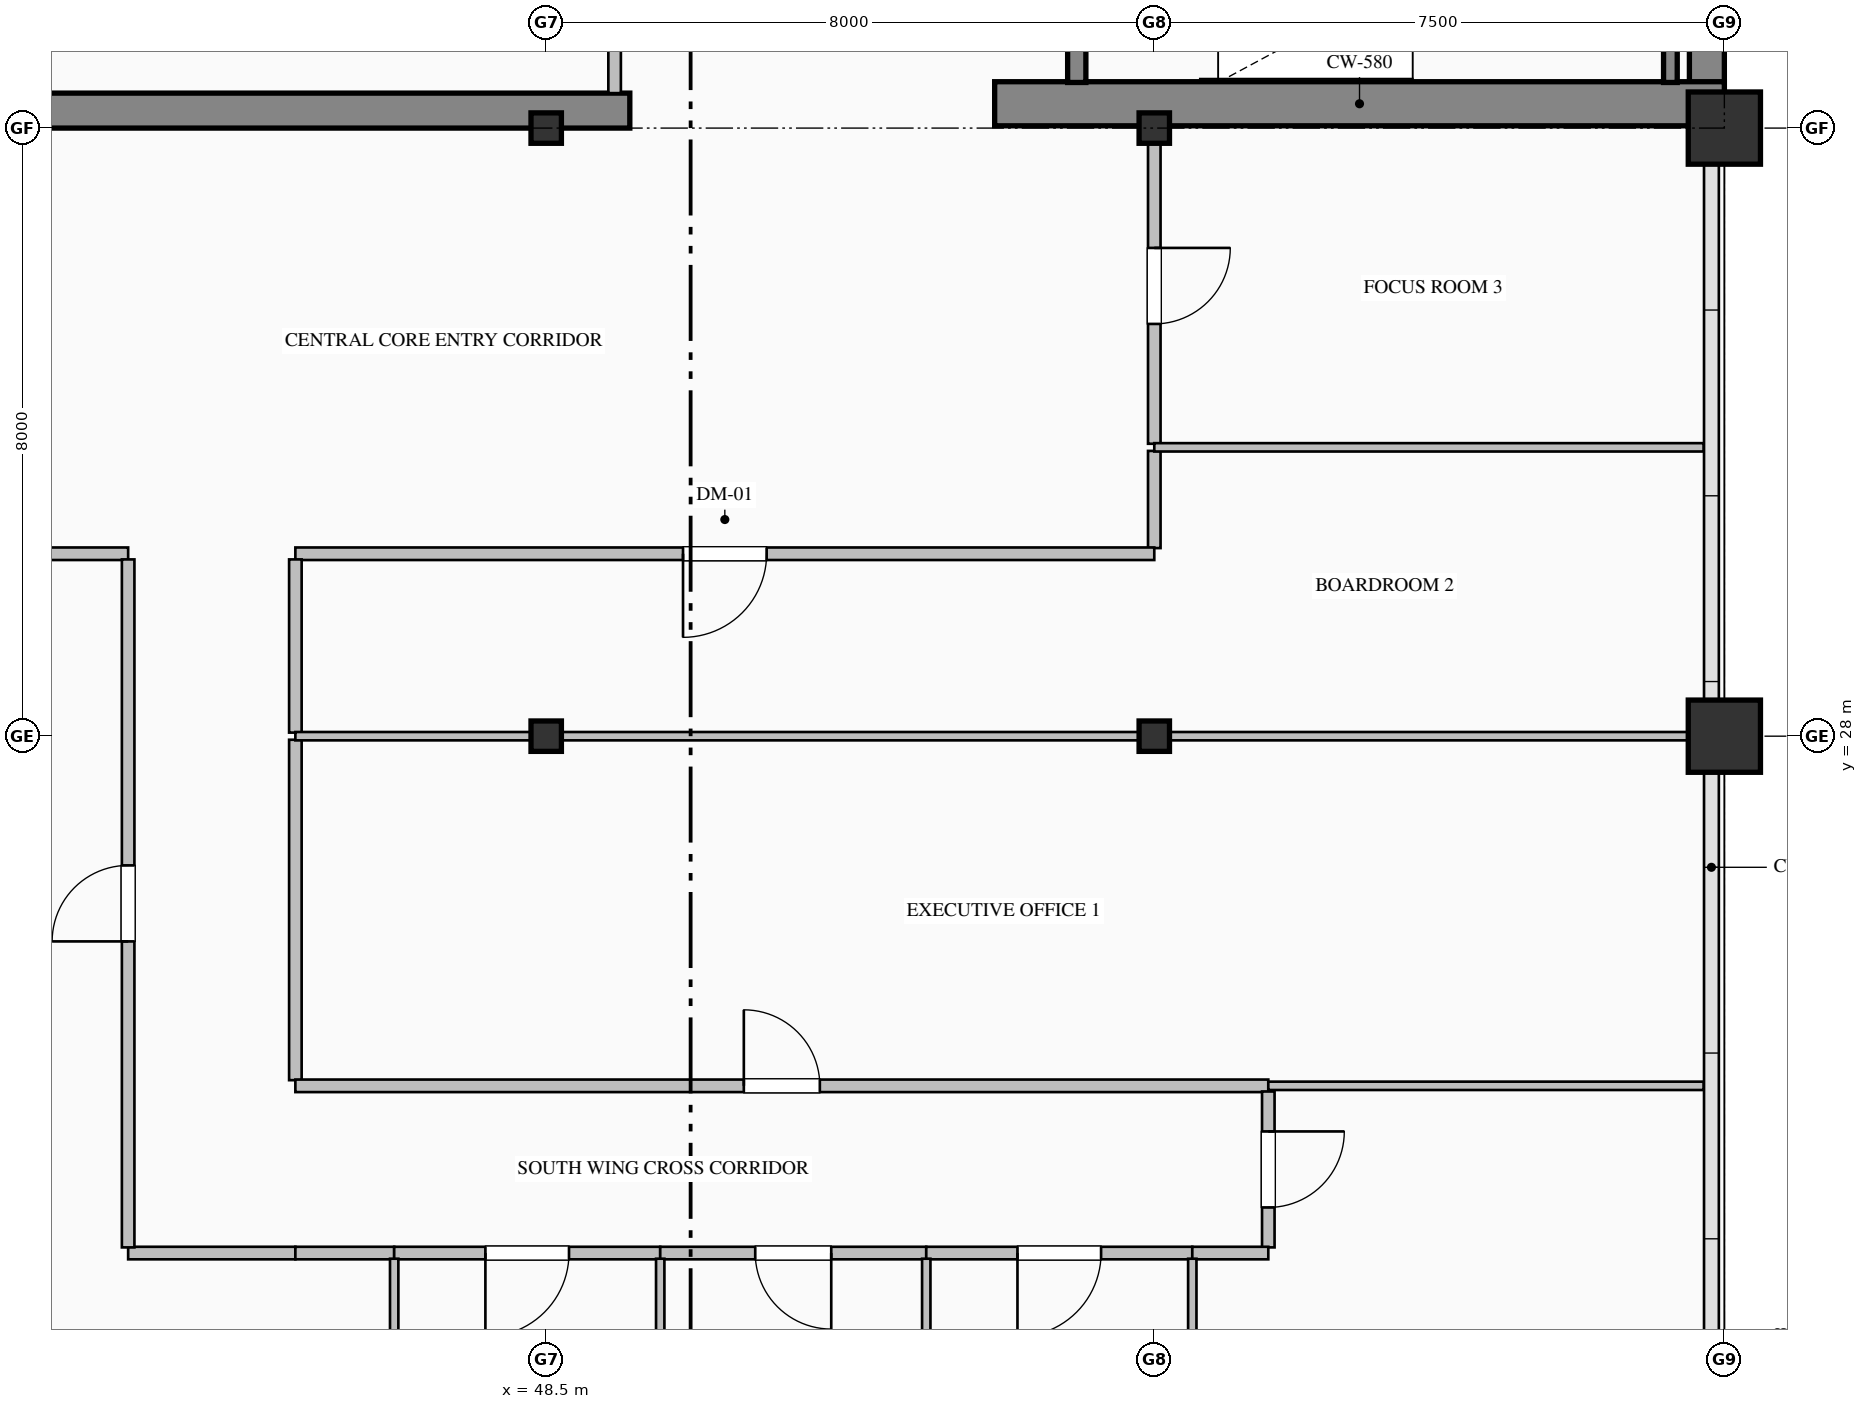
"""IFC4 building model, lengths in metres.
Left out: names, types, materials, properties, quantities, classifications, styles, units other than length and angle.
Written with IfcOpenShell. Run it as: python <this file> out.ifc"""

import sys

from ifc_helpers import new_model, si_unit, direction, frame, frame_2d, origin, origin_2d, place, context, subcontext, project, spatial, rectangle, hollow_rectangle, i_section, extrude, element, fill, save


model = new_model("IFC4")
c1 = context("Model", 3, precision=1e-05, world=origin(), true_north=direction((0.0, 1.0)))
c2 = subcontext(c1, "Body", "Model", "MODEL_VIEW")
j1 = project(units=[si_unit("LENGTHUNIT", "METRE"), si_unit("PLANEANGLEUNIT", "RADIAN")], contexts=[c1])
p1 = place(None, origin())
s1 = spatial("IfcSite", under=j1, at=p1, CompositionType="ELEMENT")
p2 = place(p1, origin())
s2 = spatial("IfcBuilding", under=s1, at=p2, CompositionType="ELEMENT")
p3 = place(p2, frame((0.0, 0.0, 205.8)))
s3 = spatial("IfcBuildingStorey", under=s2, at=p3, CompositionType="ELEMENT", Elevation=205.8)
p4 = place(p3, frame((63.77, 36.32, 0.0), z_axis=(0.0, 0.0, 1.0), x_axis=(0.0, 1.0, 0.0)))
e1 = element("IfcWall", 1, at=p4, inside=s3, PredefinedType="SHEAR", context=c2, shape_type="SweptSolid", body=[
    extrude(rectangle(XDim=15.22, YDim=0.46, at=frame_2d((7.61, 0.0))), origin(), (0.0, 0.0, 1.0), 3.775),
])
p5 = place(p3, frame((40.5, 36.23, 0.0), z_axis=(0.0, 0.0, 1.0), x_axis=(1.0, 0.0, 0.0)))
e2 = element("IfcWall", 2, at=p5, inside=s3, PredefinedType="SHEAR", context=c2, shape_type="SweptSolid", body=[
    extrude(rectangle(XDim=9.1, YDim=0.46, at=frame_2d((4.55, 0.0))), origin(), (0.0, 0.0, 1.0), 3.775),
])
p6 = place(p3, frame((54.4, 36.32, 0.0), z_axis=(0.0, 0.0, 1.0), x_axis=(1.0, 0.0, 0.0)))
e3 = element("IfcWall", 3, at=p6, inside=s3, PredefinedType="SHEAR", context=c2, shape_type="SweptSolid", body=[
    extrude(rectangle(XDim=9.6, YDim=0.58, at=frame_2d((4.8, 0.0))), origin(), (0.0, 0.0, 1.0), 4.0),
])
for number, where, z_axis, x_axis in (
    (4, (48.5, 28.0, 0.0), (0.0, 0.0, 1.0), (1.0, 0.0, 0.0)),
    (5, (48.5, 36.0, 0.0), (0.0, 0.0, 1.0), (1.0, 0.0, 0.0)),
    (6, (56.5, 28.0, 0.0), (0.0, 0.0, 1.0), (1.0, 0.0, 0.0)),
    (7, (56.5, 36.0, 0.0), (0.0, 0.0, 1.0), (1.0, 0.0, 0.0)),
):
    element("IfcColumn", number, at=place(p3, frame(where, z_axis=z_axis, x_axis=x_axis)), inside=s3, PredefinedType="COLUMN", context=c2, shape_type="SweptSolid", body=[
        extrude(i_section(OverallWidth=0.4, OverallDepth=0.4, WebThickness=0.013, FlangeThickness=0.021, FilletRadius=0.022, at=origin_2d()), origin(), (0.0, 0.0, 1.0), 4.0),
    ])
for number, where, z_axis, x_axis in (
    (8, (64.0, 28.0, 0.0), (0.0, 0.0, 1.0), (1.0, 0.0, 0.0)),
    (9, (64.0, 36.0, 0.0), (0.0, 0.0, 1.0), (1.0, 0.0, 0.0)),
):
    element("IfcColumn", number, at=place(p3, frame(where, z_axis=z_axis, x_axis=x_axis)), inside=s3, PredefinedType="COLUMN", context=c2, shape_type="SweptSolid", body=[
        extrude(hollow_rectangle(XDim=0.95, YDim=0.95, WallThickness=0.036, at=origin_2d()), origin(), (0.0, 0.0, 1.0), 4.0),
    ])
p7 = place(p3, frame((55.48, 39.75, 0.0), z_axis=(0.0, 0.0, 1.0), x_axis=(0.0, -1.0, 0.0)))
e10 = element("IfcWall", 10, at=p7, inside=s3, PredefinedType="SOLIDWALL", context=c2, shape_type="SweptSolid", body=[
    extrude(rectangle(XDim=3.15, YDim=0.24, at=frame_2d((1.575, 0.0))), origin(), (0.0, 0.0, 1.0), 4.0),
])
p8 = place(p7, frame((1.0, 0.0, 0.0)))
e11 = element("IfcOpeningElement", 11, at=p8, cuts=e10, PredefinedType="OPENING", context=c2, shape_type="SweptSolid", body=[
    extrude(rectangle(XDim=1.15, YDim=2.2, at=frame_2d((0.575, 1.1))), frame((0.0, 0.13, 0.0), z_axis=(0.0, -1.0, 0.0), x_axis=(1.0, 0.0, 0.0)), (0.0, 0.0, 1.0), 0.26),
])
p9 = place(p3, frame((63.29, 36.6, 0.0), z_axis=(0.0, 0.0, 1.0), x_axis=(0.0, 1.0, 0.0)))
e12 = element("IfcWall", 12, at=p9, inside=s3, PredefinedType="SOLIDWALL", context=c2, shape_type="SweptSolid", body=[
    extrude(rectangle(XDim=3.15, YDim=0.18, at=frame_2d((1.575, 0.0))), origin(), (0.0, 0.0, 1.0), 4.0),
])
p10 = place(p3, frame((49.4, 36.46, 0.0), z_axis=(0.0, 0.0, 1.0), x_axis=(0.0, 1.0, 0.0)))
e13 = element("IfcWall", 13, at=p10, inside=s3, PredefinedType="PARTITIONING", context=c2, shape_type="SweptSolid", body=[
    extrude(rectangle(XDim=7.69, YDim=0.165, at=frame_2d((3.845, 0.0))), origin(), (0.0, 0.0, 1.0), 3.017),
])
p11 = place(p10, frame((3.345, 0.0, 0.0)))
e14 = element("IfcOpeningElement", 14, at=p11, cuts=e13, PredefinedType="OPENING", context=c2, shape_type="SweptSolid", body=[
    extrude(rectangle(XDim=1.0, YDim=2.15, at=frame_2d((0.5, 1.075))), frame((0.0, 0.093, 0.0), z_axis=(0.0, -1.0, 0.0), x_axis=(1.0, 0.0, 0.0)), (0.0, 0.0, 1.0), 0.185),
])
p12 = place(p3, frame((56.5, 31.753, 0.0), z_axis=(0.0, 0.0, 1.0), x_axis=(0.0, -1.0, 0.0)))
e15 = element("IfcWall", 15, at=p12, inside=s3, PredefinedType="PARTITIONING", context=c2, shape_type="SweptSolid", body=[
    extrude(rectangle(XDim=1.278, YDim=0.165, at=frame_2d((0.639, 0.0))), origin(), (0.0, 0.0, 1.0), 3.179),
])
p13 = place(p3, frame((56.5, 30.4, 0.0), z_axis=(0.0, 0.0, 1.0), x_axis=(-1.0, 0.0, 0.0)))
e16 = element("IfcWall", 16, at=p13, inside=s3, PredefinedType="PARTITIONING", context=c2, shape_type="SweptSolid", body=[
    extrude(rectangle(XDim=11.3, YDim=0.165, at=frame_2d((5.65, 0.0))), origin(), (0.0, 0.0, 1.0), 3.775),
])
p14 = place(p13, frame((5.1, 0.0, 0.0)))
e17 = element("IfcOpeningElement", 17, at=p14, cuts=e16, PredefinedType="OPENING", context=c2, shape_type="SweptSolid", body=[
    extrude(rectangle(XDim=1.1, YDim=2.2, at=frame_2d((0.55, 1.1))), frame((0.0, 0.093, 0.0), z_axis=(0.0, -1.0, 0.0), x_axis=(1.0, 0.0, 0.0)), (0.0, 0.0, 1.0), 0.185),
])
p15 = place(p3, frame((56.5, 36.0, 0.0), z_axis=(0.0, 0.0, 1.0), x_axis=(0.0, -1.0, 0.0)))
e18 = element("IfcWall", 18, at=p15, inside=s3, PredefinedType="PARTITIONING", context=c2, shape_type="SweptSolid", body=[
    extrude(rectangle(XDim=4.153, YDim=0.165, at=frame_2d((2.077, 0.0))), origin(), (0.0, 0.0, 1.0), 3.179),
])
p16 = place(p15, frame((1.576, 0.0, 0.0)))
e19 = element("IfcOpeningElement", 19, at=p16, cuts=e18, PredefinedType="OPENING", context=c2, shape_type="SweptSolid", body=[
    extrude(rectangle(XDim=1.0, YDim=2.15, at=frame_2d((0.5, 1.075))), frame((0.0, 0.093, 0.0), z_axis=(0.0, -1.0, 0.0), x_axis=(1.0, 0.0, 0.0)), (0.0, 0.0, 1.0), 0.185),
])
p17 = place(p3, frame((43.0, 30.4, 0.0), z_axis=(0.0, 0.0, 1.0), x_axis=(-1.0, 0.0, 0.0)))
e20 = element("IfcWall", 20, at=p17, inside=s3, PredefinedType="PARTITIONING", context=c2, shape_type="SweptSolid", body=[
    extrude(rectangle(XDim=2.5, YDim=0.165, at=frame_2d((1.25, 0.0))), origin(), (0.0, 0.0, 1.0), 3.775),
])
p18 = place(p3, frame((45.2, 27.953, 0.0), z_axis=(0.0, 0.0, 1.0), x_axis=(0.0, -1.0, 0.0)))
e21 = element("IfcWall", 21, at=p18, inside=s3, PredefinedType="PARTITIONING", context=c2, shape_type="SweptSolid", body=[
    extrude(rectangle(XDim=4.478, YDim=0.165, at=frame_2d((2.239, 0.0))), origin(), (0.0, 0.0, 1.0), 3.775),
])
p19 = place(p3, frame((45.2, 30.325, 0.0), z_axis=(0.0, 0.0, 1.0), x_axis=(0.0, -1.0, 0.0)))
e22 = element("IfcWall", 22, at=p19, inside=s3, PredefinedType="PARTITIONING", context=c2, shape_type="SweptSolid", body=[
    extrude(rectangle(XDim=2.278, YDim=0.165, at=frame_2d((1.139, 0.0))), origin(), (0.0, 0.0, 1.0), 3.775),
])
p20 = place(p3, frame((45.2, 21.2, 0.0), z_axis=(0.0, 0.0, 1.0), x_axis=(-1.0, 0.0, 0.0)))
e23 = element("IfcWall", 23, at=p20, inside=s3, PredefinedType="PARTITIONING", context=c2, shape_type="SweptSolid", body=[
    extrude(rectangle(XDim=2.2, YDim=0.165, at=frame_2d((1.1, 0.0))), origin(), (0.0, 0.0, 1.0), 3.775),
])
p21 = place(p3, frame((43.0, 21.274, 0.0), z_axis=(0.0, 0.0, 1.0), x_axis=(0.0, 1.0, 0.0)))
e24 = element("IfcWall", 24, at=p21, inside=s3, PredefinedType="PARTITIONING", context=c2, shape_type="SweptSolid", body=[
    extrude(rectangle(XDim=9.051, YDim=0.165, at=frame_2d((4.525, 0.0))), origin(), (0.0, 0.0, 1.0), 3.775),
])
p22 = place(p21, frame((4.025, 0.0, 0.0)))
e25 = element("IfcOpeningElement", 25, at=p22, cuts=e24, PredefinedType="OPENING", context=c2, shape_type="SweptSolid", body=[
    extrude(rectangle(XDim=1.0, YDim=2.15, at=frame_2d((0.5, 1.075))), frame((0.0, 0.093, 0.0), z_axis=(0.0, -1.0, 0.0), x_axis=(1.0, 0.0, 0.0)), (0.0, 0.0, 1.0), 0.185),
])
p23 = place(p3, frame((45.2, 23.4, 0.0), z_axis=(0.0, 0.0, 1.0), x_axis=(1.0, 0.0, 0.0)))
e26 = element("IfcWall", 26, at=p23, inside=s3, PredefinedType="PARTITIONING", context=c2, shape_type="SweptSolid", body=[
    extrude(rectangle(XDim=12.8, YDim=0.165, at=frame_2d((6.4, 0.0))), origin(), (0.0, 0.0, 1.0), 3.467),
])
p24 = place(p23, frame((5.9, 0.0, 0.0)))
e27 = element("IfcOpeningElement", 27, at=p24, cuts=e26, PredefinedType="OPENING", context=c2, shape_type="SweptSolid", body=[
    extrude(rectangle(XDim=1.0, YDim=2.15, at=frame_2d((0.5, 1.075))), frame((0.0, 0.093, 0.0), z_axis=(0.0, -1.0, 0.0), x_axis=(1.0, 0.0, 0.0)), (0.0, 0.0, 1.0), 0.185),
])
p25 = place(p3, frame((46.5, 21.2, 0.0), z_axis=(0.0, 0.0, 1.0), x_axis=(-1.0, 0.0, 0.0)))
e28 = element("IfcWall", 28, at=p25, inside=s3, PredefinedType="PARTITIONING", context=c2, shape_type="SweptSolid", body=[
    extrude(rectangle(XDim=1.3, YDim=0.165, at=frame_2d((0.65, 0.0))), origin(), (0.0, 0.0, 1.0), 3.775),
])
p26 = place(p3, frame((50.0, 21.2, 0.0), z_axis=(0.0, 0.0, 1.0), x_axis=(-1.0, 0.0, 0.0)))
e29 = element("IfcWall", 29, at=p26, inside=s3, PredefinedType="PARTITIONING", context=c2, shape_type="SweptSolid", body=[
    extrude(rectangle(XDim=3.5, YDim=0.165, at=frame_2d((1.75, 0.0))), origin(), (0.0, 0.0, 1.0), 3.775),
])
p27 = place(p26, frame((1.2, 0.0, 0.0)))
e30 = element("IfcOpeningElement", 30, at=p27, cuts=e29, PredefinedType="OPENING", context=c2, shape_type="SweptSolid", body=[
    extrude(rectangle(XDim=1.1, YDim=2.2, at=frame_2d((0.55, 1.1))), frame((0.0, 0.093, 0.0), z_axis=(0.0, -1.0, 0.0), x_axis=(1.0, 0.0, 0.0)), (0.0, 0.0, 1.0), 0.185),
])
p28 = place(p3, frame((53.5, 21.2, 0.0), z_axis=(0.0, 0.0, 1.0), x_axis=(-1.0, 0.0, 0.0)))
e31 = element("IfcWall", 31, at=p28, inside=s3, PredefinedType="PARTITIONING", context=c2, shape_type="SweptSolid", body=[
    extrude(rectangle(XDim=3.5, YDim=0.165, at=frame_2d((1.75, 0.0))), origin(), (0.0, 0.0, 1.0), 3.775),
])
p29 = place(p28, frame((1.25, 0.0, 0.0)))
e32 = element("IfcOpeningElement", 32, at=p29, cuts=e31, PredefinedType="OPENING", context=c2, shape_type="SweptSolid", body=[
    extrude(rectangle(XDim=1.0, YDim=2.15, at=frame_2d((0.5, 1.075))), frame((0.0, 0.093, 0.0), z_axis=(0.0, -1.0, 0.0), x_axis=(1.0, 0.0, 0.0)), (0.0, 0.0, 1.0), 0.185),
])
p30 = place(p3, frame((57.0, 21.2, 0.0), z_axis=(0.0, 0.0, 1.0), x_axis=(-1.0, 0.0, 0.0)))
e33 = element("IfcWall", 33, at=p30, inside=s3, PredefinedType="PARTITIONING", context=c2, shape_type="SweptSolid", body=[
    extrude(rectangle(XDim=3.5, YDim=0.165, at=frame_2d((1.75, 0.0))), origin(), (0.0, 0.0, 1.0), 3.775),
])
p31 = place(p30, frame((1.2, 0.0, 0.0)))
e34 = element("IfcOpeningElement", 34, at=p31, cuts=e33, PredefinedType="OPENING", context=c2, shape_type="SweptSolid", body=[
    extrude(rectangle(XDim=1.1, YDim=2.2, at=frame_2d((0.55, 1.1))), frame((0.0, 0.093, 0.0), z_axis=(0.0, -1.0, 0.0), x_axis=(1.0, 0.0, 0.0)), (0.0, 0.0, 1.0), 0.185),
])
p32 = place(p3, frame((58.0, 23.325, 0.0), z_axis=(0.0, 0.0, 1.0), x_axis=(0.0, -1.0, 0.0)))
e35 = element("IfcWall", 35, at=p32, inside=s3, PredefinedType="PARTITIONING", context=c2, shape_type="SweptSolid", body=[
    extrude(rectangle(XDim=2.051, YDim=0.165, at=frame_2d((1.025, 0.0))), origin(), (0.0, 0.0, 1.0), 3.775),
])
p33 = place(p32, frame((0.525, 0.0, 0.0)))
e36 = element("IfcOpeningElement", 36, at=p33, cuts=e35, PredefinedType="OPENING", context=c2, shape_type="SweptSolid", body=[
    extrude(rectangle(XDim=1.0, YDim=2.15, at=frame_2d((0.5, 1.075))), frame((0.0, 0.093, 0.0), z_axis=(0.0, -1.0, 0.0), x_axis=(1.0, 0.0, 0.0)), (0.0, 0.0, 1.0), 0.185),
])
p34 = place(p3, frame((58.0, 21.2, 0.0), z_axis=(0.0, 0.0, 1.0), x_axis=(-1.0, 0.0, 0.0)))
e37 = element("IfcWall", 37, at=p34, inside=s3, PredefinedType="PARTITIONING", context=c2, shape_type="SweptSolid", body=[
    extrude(rectangle(XDim=1.0, YDim=0.165, at=frame_2d((0.5, 0.0))), origin(), (0.0, 0.0, 1.0), 3.775),
])
p35 = place(p3, frame((45.2, 28.0, 0.0), z_axis=(0.0, 0.0, 1.0), x_axis=(1.0, 0.0, 0.0)))
e38 = element("IfcWall", 38, at=p35, inside=s3, PredefinedType="MOVABLE", context=c2, shape_type="SweptSolid", body=[
    extrude(rectangle(XDim=18.528, YDim=0.11, at=frame_2d((9.264, 0.0))), origin(), (0.0, 0.0, 1.0), 3.179),
])
p36 = place(p3, frame((63.728, 23.4, 0.0), z_axis=(0.0, 0.0, 1.0), x_axis=(-1.0, 0.0, 0.0)))
e39 = element("IfcWall", 39, at=p36, inside=s3, PredefinedType="MOVABLE", context=c2, shape_type="SweptSolid", body=[
    extrude(rectangle(XDim=5.728, YDim=0.11, at=frame_2d((2.864, 0.0))), origin(), (0.0, 0.0, 1.0), 3.775),
])
p37 = place(p3, frame((56.5, 31.8, 0.0), z_axis=(0.0, 0.0, 1.0), x_axis=(1.0, 0.0, 0.0)))
e40 = element("IfcWall", 40, at=p37, inside=s3, PredefinedType="MOVABLE", context=c2, shape_type="SweptSolid", body=[
    extrude(rectangle(XDim=7.228, YDim=0.11, at=frame_2d((3.614, 0.0))), origin(), (0.0, 0.0, 1.0), 3.775),
])
for number, where, z_axis, x_axis in (
    (41, (46.5, 21.125, 0.0), (0.0, 0.0, 1.0), (0.0, -1.0, 0.0)),
    (42, (50.0, 21.125, 0.0), (0.0, 0.0, 1.0), (0.0, -1.0, 0.0)),
    (43, (53.5, 21.125, 0.0), (0.0, 0.0, 1.0), (0.0, -1.0, 0.0)),
    (44, (57.0, 21.125, 0.0), (0.0, 0.0, 1.0), (0.0, -1.0, 0.0)),
):
    element("IfcWall", number, at=place(p3, frame(where, z_axis=z_axis, x_axis=x_axis)), inside=s3, PredefinedType="MOVABLE", context=c2, shape_type="SweptSolid", body=[
        extrude(rectangle(XDim=8.293, YDim=0.11, at=frame_2d((4.147, 0.0))), origin(), (0.0, 0.0, 1.0), 3.775),
    ])
p38 = place(p24, origin())
e45 = element("IfcDoor", 45, at=p38, inside=s3, OperationType="SINGLE_SWING_LEFT", PredefinedType="DOOR", context=c2, shape_type="SweptSolid", body=[
    extrude(rectangle(XDim=1.0, YDim=2.15, at=frame_2d((0.5, 1.075))), frame((0.0, 0.025, 0.0), z_axis=(0.0, -1.0, 0.0), x_axis=(1.0, 0.0, 0.0)), (0.0, 0.0, 1.0), 0.05),
])
fill(e27, e45)
p39 = place(p14, origin())
e46 = element("IfcDoor", 46, at=p39, inside=s3, OperationType="SINGLE_SWING_RIGHT", PredefinedType="DOOR", context=c2, shape_type="SweptSolid", body=[
    extrude(rectangle(XDim=1.1, YDim=2.2, at=frame_2d((0.55, 1.1))), frame((0.0, 0.025, 0.0), z_axis=(0.0, -1.0, 0.0), x_axis=(1.0, 0.0, 0.0)), (0.0, 0.0, 1.0), 0.05),
])
fill(e17, e46)
p40 = place(p16, origin())
e47 = element("IfcDoor", 47, at=p40, inside=s3, OperationType="SINGLE_SWING_LEFT", PredefinedType="DOOR", context=c2, shape_type="SweptSolid", body=[
    extrude(rectangle(XDim=1.0, YDim=2.15, at=frame_2d((0.5, 1.075))), frame((0.0, 0.025, 0.0), z_axis=(0.0, -1.0, 0.0), x_axis=(1.0, 0.0, 0.0)), (0.0, 0.0, 1.0), 0.05),
])
fill(e19, e47)
p41 = place(p22, origin())
e48 = element("IfcDoor", 48, at=p41, inside=s3, OperationType="SINGLE_SWING_LEFT", PredefinedType="DOOR", context=c2, shape_type="SweptSolid", body=[
    extrude(rectangle(XDim=1.0, YDim=2.15, at=frame_2d((0.5, 1.075))), frame((0.0, 0.025, 0.0), z_axis=(0.0, -1.0, 0.0), x_axis=(1.0, 0.0, 0.0)), (0.0, 0.0, 1.0), 0.05),
])
fill(e25, e48)
p42 = place(p27, origin())
e49 = element("IfcDoor", 49, at=p42, inside=s3, OperationType="SINGLE_SWING_RIGHT", PredefinedType="DOOR", context=c2, shape_type="SweptSolid", body=[
    extrude(rectangle(XDim=1.1, YDim=2.2, at=frame_2d((0.55, 1.1))), frame((0.0, 0.025, 0.0), z_axis=(0.0, -1.0, 0.0), x_axis=(1.0, 0.0, 0.0)), (0.0, 0.0, 1.0), 0.05),
])
fill(e30, e49)
p43 = place(p29, origin())
e50 = element("IfcDoor", 50, at=p43, inside=s3, OperationType="SINGLE_SWING_LEFT", PredefinedType="DOOR", context=c2, shape_type="SweptSolid", body=[
    extrude(rectangle(XDim=1.0, YDim=2.15, at=frame_2d((0.5, 1.075))), frame((0.0, 0.025, 0.0), z_axis=(0.0, -1.0, 0.0), x_axis=(1.0, 0.0, 0.0)), (0.0, 0.0, 1.0), 0.05),
])
fill(e32, e50)
p44 = place(p31, origin())
e51 = element("IfcDoor", 51, at=p44, inside=s3, OperationType="SINGLE_SWING_RIGHT", PredefinedType="DOOR", context=c2, shape_type="SweptSolid", body=[
    extrude(rectangle(XDim=1.1, YDim=2.2, at=frame_2d((0.55, 1.1))), frame((0.0, 0.025, 0.0), z_axis=(0.0, -1.0, 0.0), x_axis=(1.0, 0.0, 0.0)), (0.0, 0.0, 1.0), 0.05),
])
fill(e34, e51)
p45 = place(p33, origin())
e52 = element("IfcDoor", 52, at=p45, inside=s3, OperationType="SINGLE_SWING_LEFT", PredefinedType="DOOR", context=c2, shape_type="SweptSolid", body=[
    extrude(rectangle(XDim=1.0, YDim=2.15, at=frame_2d((0.5, 1.075))), frame((0.0, 0.025, 0.0), z_axis=(0.0, -1.0, 0.0), x_axis=(1.0, 0.0, 0.0)), (0.0, 0.0, 1.0), 0.05),
])
fill(e36, e52)
save(model, sys.argv[1])
